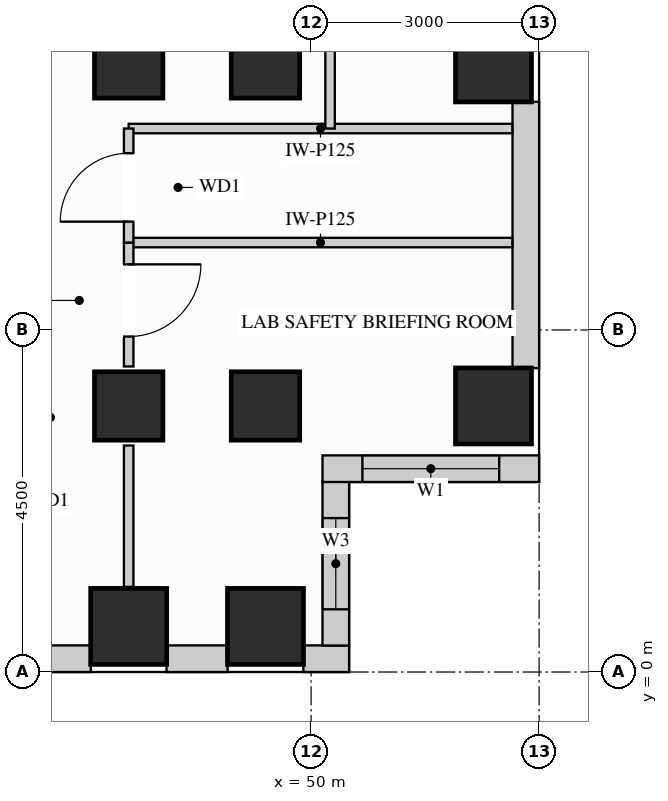
"""IFC4 building model, lengths in metres.
Left out: names, types, materials, properties, quantities, classifications, styles, units other than length and angle.
Written with IfcOpenShell. Run it as: python <this file> out.ifc"""

import sys

from ifc_helpers import new_model, si_unit, direction, frame, frame_2d, origin, origin_2d, place, context, subcontext, project, spatial, rectangle, extrude, source, transform, mapped, element, fill, save


model = new_model("IFC4")
c1 = context("Model", 3, precision=1e-05, world=origin(), true_north=direction((0.0, 1.0)))
c2 = subcontext(c1, "Body", "Model", "MODEL_VIEW")
j1 = project(units=[si_unit("LENGTHUNIT", "METRE"), si_unit("PLANEANGLEUNIT", "RADIAN")], contexts=[c1])
p1 = place(None, origin())
s1 = spatial("IfcSite", under=j1, at=p1, CompositionType="ELEMENT")
p2 = place(p1, origin())
s2 = spatial("IfcBuilding", under=s1, at=p2, CompositionType="ELEMENT")
p3 = place(p2, frame((0.0, 0.0, 161.1)))
s3 = spatial("IfcBuildingStorey", under=s2, at=p3, CompositionType="ELEMENT", Elevation=161.1)
m1 = source(origin(), c2, "Body", "SweptSolid", [
    extrude(rectangle(XDim=0.9, YDim=0.9, at=origin_2d()), origin(), (0.0, 0.0, 1.0), 3.4),
])
for number, where, z_axis, x_axis in (
    (1, (47.6, 3.5, 0.0), (0.0, 0.0, 1.0), (1.0, 0.0, 0.0)),
    (2, (47.6, 8.0, 0.0), (0.0, 0.0, 1.0), (1.0, 0.0, 0.0)),
    (3, (49.4, 3.5, 0.0), (0.0, 0.0, 1.0), (1.0, 0.0, 0.0)),
    (4, (49.4, 8.0, 0.0), (0.0, 0.0, 1.0), (1.0, 0.0, 0.0)),
):
    element("IfcColumn", number, at=place(p3, frame(where, z_axis=z_axis, x_axis=x_axis)), inside=s3, PredefinedType="COLUMN", context=c2, shape_type="MappedRepresentation", body=[
        mapped(m1, transform((0.0, 0.0, 0.0), x_axis=(1.0, 0.0, 0.0), y_axis=(0.0, 1.0, 0.0), z_axis=(0.0, 0.0, 1.0))),
    ])
m2 = source(origin(), c2, "Body", "SweptSolid", [
    extrude(rectangle(XDim=1.0, YDim=1.0, at=origin_2d()), origin(), (0.0, 0.0, 1.0), 3.4),
])
for number, where, z_axis, x_axis in (
    (5, (52.4, 3.5, 0.0), (0.0, 0.0, 1.0), (1.0, 0.0, 0.0)),
    (6, (52.4, 8.0, 0.0), (0.0, 0.0, 1.0), (1.0, 0.0, 0.0)),
    (7, (47.6, 0.6, 0.0), (0.0, 0.0, 1.0), (1.0, 0.0, 0.0)),
    (8, (49.4, 0.6, 0.0), (0.0, 0.0, 1.0), (1.0, 0.0, 0.0)),
):
    element("IfcColumn", number, at=place(p3, frame(where, z_axis=z_axis, x_axis=x_axis)), inside=s3, PredefinedType="COLUMN", context=c2, shape_type="MappedRepresentation", body=[
        mapped(m2, transform((0.0, 0.0, 0.0), x_axis=(1.0, 0.0, 0.0), y_axis=(0.0, 1.0, 0.0), z_axis=(0.0, 0.0, 1.0))),
    ])
p4 = place(p3, frame((40.498, 0.175, 0.0), z_axis=(0.0, 0.0, 1.0), x_axis=(1.0, 0.0, 0.0)))
e9 = element("IfcWall", 9, at=p4, inside=s3, PredefinedType="SOLIDWALL", context=c2, shape_type="SweptSolid", body=[
    extrude(rectangle(XDim=6.604, YDim=0.35, at=frame_2d((3.302, 0.0))), origin(), (0.0, 0.0, 1.0), 2.448),
])
p5 = place(p4, frame((0.737, 0.0, 0.78)))
e10 = element("IfcOpeningElement", 10, at=p5, cuts=e9, PredefinedType="OPENING", context=c2, shape_type="SweptSolid", body=[
    extrude(rectangle(XDim=1.8, YDim=1.488, at=frame_2d((0.9, 0.744))), frame((0.0, 0.185, 0.0), z_axis=(0.0, -1.0, 0.0), x_axis=(1.0, 0.0, 0.0)), (0.0, 0.0, 1.0), 0.37),
])
p6 = place(p4, frame((2.955, 0.0, 0.78)))
e11 = element("IfcOpeningElement", 11, at=p6, cuts=e9, PredefinedType="OPENING", context=c2, shape_type="SweptSolid", body=[
    extrude(rectangle(XDim=1.8, YDim=1.488, at=frame_2d((0.9, 0.744))), frame((0.0, 0.185, 0.0), z_axis=(0.0, -1.0, 0.0), x_axis=(1.0, 0.0, 0.0)), (0.0, 0.0, 1.0), 0.37),
])
m3 = source(origin(), c2, "Body", "SweptSolid", [
    extrude(rectangle(XDim=0.804, YDim=0.35, at=frame_2d((0.402, 0.0))), origin(), (0.0, 0.0, 1.0), 3.385),
])
p7 = place(p3, frame((48.098, 0.175, 0.0), z_axis=(0.0, 0.0, 1.0), x_axis=(1.0, 0.0, 0.0)))
e12 = element("IfcWall", 12, at=p7, inside=s3, PredefinedType="SOLIDWALL", context=c2, shape_type="MappedRepresentation", body=[
    mapped(m3, transform((0.0, 0.0, 0.0), x_axis=(1.0, 0.0, 0.0), y_axis=(0.0, 1.0, 0.0), z_axis=(0.0, 0.0, 1.0))),
])
m4 = source(origin(), c2, "Body", "SweptSolid", [
    extrude(rectangle(XDim=0.602, YDim=0.35, at=frame_2d((0.301, 0.0))), origin(), (0.0, 0.0, 1.0), 3.385),
])
p8 = place(p3, frame((49.898, 0.175, 0.0), z_axis=(0.0, 0.0, 1.0), x_axis=(1.0, 0.0, 0.0)))
e13 = element("IfcWall", 13, at=p8, inside=s3, PredefinedType="SOLIDWALL", context=c2, shape_type="MappedRepresentation", body=[
    mapped(m4, transform((0.0, 0.0, 0.0), x_axis=(1.0, 0.0, 0.0), y_axis=(0.0, 1.0, 0.0), z_axis=(0.0, 0.0, 1.0))),
])
p9 = place(p3, frame((50.325, 0.348, 0.0), z_axis=(0.0, 0.0, 1.0), x_axis=(0.0, 1.0, 0.0)))
e14 = element("IfcWall", 14, at=p9, inside=s3, PredefinedType="SOLIDWALL", context=c2, shape_type="SweptSolid", body=[
    extrude(rectangle(XDim=2.154, YDim=0.35, at=frame_2d((1.077, 0.0))), origin(), (0.0, 0.0, 1.0), 3.385),
])
p10 = place(p9, frame((0.477, 0.0, 0.78)))
e15 = element("IfcOpeningElement", 15, at=p10, cuts=e14, PredefinedType="OPENING", context=c2, shape_type="SweptSolid", body=[
    extrude(rectangle(XDim=1.2, YDim=2.1, at=frame_2d((0.6, 1.05))), frame((0.0, 0.185, 0.0), z_axis=(0.0, -1.0, 0.0), x_axis=(1.0, 0.0, 0.0)), (0.0, 0.0, 1.0), 0.37),
])
p11 = place(p3, frame((50.15, 2.675, 0.0), z_axis=(0.0, 0.0, 1.0), x_axis=(1.0, 0.0, 0.0)))
e16 = element("IfcWall", 16, at=p11, inside=s3, PredefinedType="SOLIDWALL", context=c2, shape_type="SweptSolid", body=[
    extrude(rectangle(XDim=2.85, YDim=0.35, at=frame_2d((1.425, 0.0))), origin(), (0.0, 0.0, 1.0), 3.385),
])
p12 = place(p11, frame((0.525, 0.0, 0.78)))
e17 = element("IfcOpeningElement", 17, at=p12, cuts=e16, PredefinedType="OPENING", context=c2, shape_type="SweptSolid", body=[
    extrude(rectangle(XDim=1.8, YDim=2.1, at=frame_2d((0.9, 1.05))), frame((0.0, 0.185, 0.0), z_axis=(0.0, -1.0, 0.0), x_axis=(1.0, 0.0, 0.0)), (0.0, 0.0, 1.0), 0.37),
])
m5 = source(origin(), c2, "Body", "SweptSolid", [
    extrude(rectangle(XDim=3.504, YDim=0.35, at=frame_2d((1.752, 0.0))), origin(), (0.0, 0.0, 1.0), 2.612),
])
p13 = place(p3, frame((52.825, 3.998, 0.0), z_axis=(0.0, 0.0, 1.0), x_axis=(0.0, 1.0, 0.0)))
e18 = element("IfcWall", 18, at=p13, inside=s3, PredefinedType="SOLIDWALL", context=c2, shape_type="MappedRepresentation", body=[
    mapped(m5, transform((0.0, 0.0, 0.0), x_axis=(1.0, 0.0, 0.0), y_axis=(0.0, 1.0, 0.0), z_axis=(0.0, 0.0, 1.0))),
])
m6 = source(origin(), c2, "Body", "SweptSolid", [
    extrude(rectangle(XDim=5.048, YDim=0.125, at=frame_2d((2.524, 0.0))), origin(), (0.0, 0.0, 1.0), 3.385),
])
for number, where, z_axis, x_axis in (
    (19, (47.6, 5.65, 0.0), (0.0, 0.0, 1.0), (1.0, 0.0, 0.0)),
    (20, (47.6, 7.15, 0.0), (0.0, 0.0, 1.0), (1.0, 0.0, 0.0)),
):
    element("IfcWall", number, at=place(p3, frame(where, z_axis=z_axis, x_axis=x_axis)), inside=s3, PredefinedType="PARTITIONING", context=c2, shape_type="MappedRepresentation", body=[
        mapped(m6, transform((0.0, 0.0, 0.0), x_axis=(1.0, 0.0, 0.0), y_axis=(0.0, 1.0, 0.0), z_axis=(0.0, 0.0, 1.0))),
    ])
m7 = source(origin(), c2, "Body", "SweptSolid", [
    extrude(rectangle(XDim=3.45, YDim=0.125, at=frame_2d((1.725, 0.0))), origin(), (0.0, 0.0, 1.0), 3.385),
])
p14 = place(p3, frame((50.25, 7.15, 0.0), z_axis=(0.0, 0.0, 1.0), x_axis=(0.0, 1.0, 0.0)))
e21 = element("IfcWall", 21, at=p14, inside=s3, PredefinedType="PARTITIONING", context=c2, shape_type="MappedRepresentation", body=[
    mapped(m7, transform((0.0, 0.0, 0.0), x_axis=(1.0, 0.0, 0.0), y_axis=(0.0, 1.0, 0.0), z_axis=(0.0, 0.0, 1.0))),
])
p15 = place(p3, frame((47.6, 4.02, 0.0), z_axis=(0.0, 0.0, 1.0), x_axis=(0.0, 1.0, 0.0)))
e22 = element("IfcWall", 22, at=p15, inside=s3, PredefinedType="PARTITIONING", context=c2, shape_type="SweptSolid", body=[
    extrude(rectangle(XDim=1.63, YDim=0.125, at=frame_2d((0.815, 0.0))), origin(), (0.0, 0.0, 1.0), 2.773),
])
p16 = place(p15, frame((0.393, 0.0, 0.0)))
e23 = element("IfcOpeningElement", 23, at=p16, cuts=e22, PredefinedType="OPENING", context=c2, shape_type="SweptSolid", body=[
    extrude(rectangle(XDim=0.95, YDim=2.15, at=frame_2d((0.475, 1.075))), frame((0.0, 0.073, 0.0), z_axis=(0.0, -1.0, 0.0), x_axis=(1.0, 0.0, 0.0)), (0.0, 0.0, 1.0), 0.145),
])
m8 = source(origin(), c2, "Body", "SweptSolid", [
    extrude(rectangle(XDim=1.86, YDim=0.125, at=frame_2d((0.93, 0.0))), origin(), (0.0, 0.0, 1.0), 2.773),
])
p17 = place(p3, frame((47.6, 1.12, 0.0), z_axis=(0.0, 0.0, 1.0), x_axis=(0.0, 1.0, 0.0)))
e24 = element("IfcWall", 24, at=p17, inside=s3, PredefinedType="PARTITIONING", context=c2, shape_type="MappedRepresentation", body=[
    mapped(m8, transform((0.0, 0.0, 0.0), x_axis=(1.0, 0.0, 0.0), y_axis=(0.0, 1.0, 0.0), z_axis=(0.0, 0.0, 1.0))),
])
p18 = place(p3, frame((47.6, 5.65, 0.0), z_axis=(0.0, 0.0, 1.0), x_axis=(0.0, 1.0, 0.0)))
e25 = element("IfcWall", 25, at=p18, inside=s3, PredefinedType="PARTITIONING", context=c2, shape_type="SweptSolid", body=[
    extrude(rectangle(XDim=1.5, YDim=0.125, at=frame_2d((0.75, 0.0))), origin(), (0.0, 0.0, 1.0), 2.773),
])
p19 = place(p18, frame((0.275, 0.0, 0.0)))
e26 = element("IfcOpeningElement", 26, at=p19, cuts=e25, PredefinedType="OPENING", context=c2, shape_type="SweptSolid", body=[
    extrude(rectangle(XDim=0.9, YDim=2.15, at=frame_2d((0.45, 1.075))), frame((0.0, 0.073, 0.0), z_axis=(0.0, -1.0, 0.0), x_axis=(1.0, 0.0, 0.0)), (0.0, 0.0, 1.0), 0.145),
])
m9 = source(origin(), c2, "Body", "SweptSolid", [
    extrude(rectangle(XDim=0.95, YDim=2.15, at=frame_2d((0.475, 1.075))), frame((0.0, 0.025, 0.0), z_axis=(0.0, -1.0, 0.0), x_axis=(1.0, 0.0, 0.0)), (0.0, 0.0, 1.0), 0.05),
])
p20 = place(p16, origin())
e27 = element("IfcDoor", 27, at=p20, inside=s3, OperationType="SINGLE_SWING_RIGHT", PredefinedType="DOOR", context=c2, shape_type="MappedRepresentation", body=[
    mapped(m9, transform((0.0, 0.0, 0.0), x_axis=(1.0, 0.0, 0.0), y_axis=(0.0, 1.0, 0.0), z_axis=(0.0, 0.0, 1.0))),
])
fill(e23, e27)
m10 = source(origin(), c2, "Body", "SweptSolid", [
    extrude(rectangle(XDim=0.9, YDim=2.15, at=frame_2d((0.45, 1.075))), frame((0.0, 0.025, 0.0), z_axis=(0.0, -1.0, 0.0), x_axis=(1.0, 0.0, 0.0)), (0.0, 0.0, 1.0), 0.05),
])
p21 = place(p19, origin())
e28 = element("IfcDoor", 28, at=p21, inside=s3, OperationType="SINGLE_SWING_LEFT", PredefinedType="DOOR", context=c2, shape_type="MappedRepresentation", body=[
    mapped(m10, transform((0.0, 0.0, 0.0), x_axis=(1.0, 0.0, 0.0), y_axis=(0.0, 1.0, 0.0), z_axis=(0.0, 0.0, 1.0))),
])
fill(e26, e28)
m11 = source(origin(), c2, "Body", "SweptSolid", [
    extrude(rectangle(XDim=1.8, YDim=2.1, at=frame_2d((0.9, 1.05))), frame((0.0, 0.03, 0.0), z_axis=(0.0, -1.0, 0.0), x_axis=(1.0, 0.0, 0.0)), (0.0, 0.0, 1.0), 0.06),
])
p22 = place(p12, origin())
e29 = element("IfcWindow", 29, at=p22, inside=s3, PartitioningType="SINGLE_PANEL", PredefinedType="WINDOW", context=c2, shape_type="MappedRepresentation", body=[
    mapped(m11, transform((0.0, 0.0, 0.0), x_axis=(1.0, 0.0, 0.0), y_axis=(0.0, 1.0, 0.0), z_axis=(0.0, 0.0, 1.0))),
])
fill(e17, e29)
m12 = source(origin(), c2, "Body", "SweptSolid", [
    extrude(rectangle(XDim=1.2, YDim=2.1, at=frame_2d((0.6, 1.05))), frame((0.0, 0.03, 0.0), z_axis=(0.0, -1.0, 0.0), x_axis=(1.0, 0.0, 0.0)), (0.0, 0.0, 1.0), 0.06),
])
p23 = place(p10, origin())
e30 = element("IfcWindow", 30, at=p23, inside=s3, PartitioningType="SINGLE_PANEL", PredefinedType="WINDOW", context=c2, shape_type="MappedRepresentation", body=[
    mapped(m12, transform((0.0, 0.0, 0.0), x_axis=(1.0, 0.0, 0.0), y_axis=(0.0, 1.0, 0.0), z_axis=(0.0, 0.0, 1.0))),
])
fill(e15, e30)
save(model, sys.argv[1])
